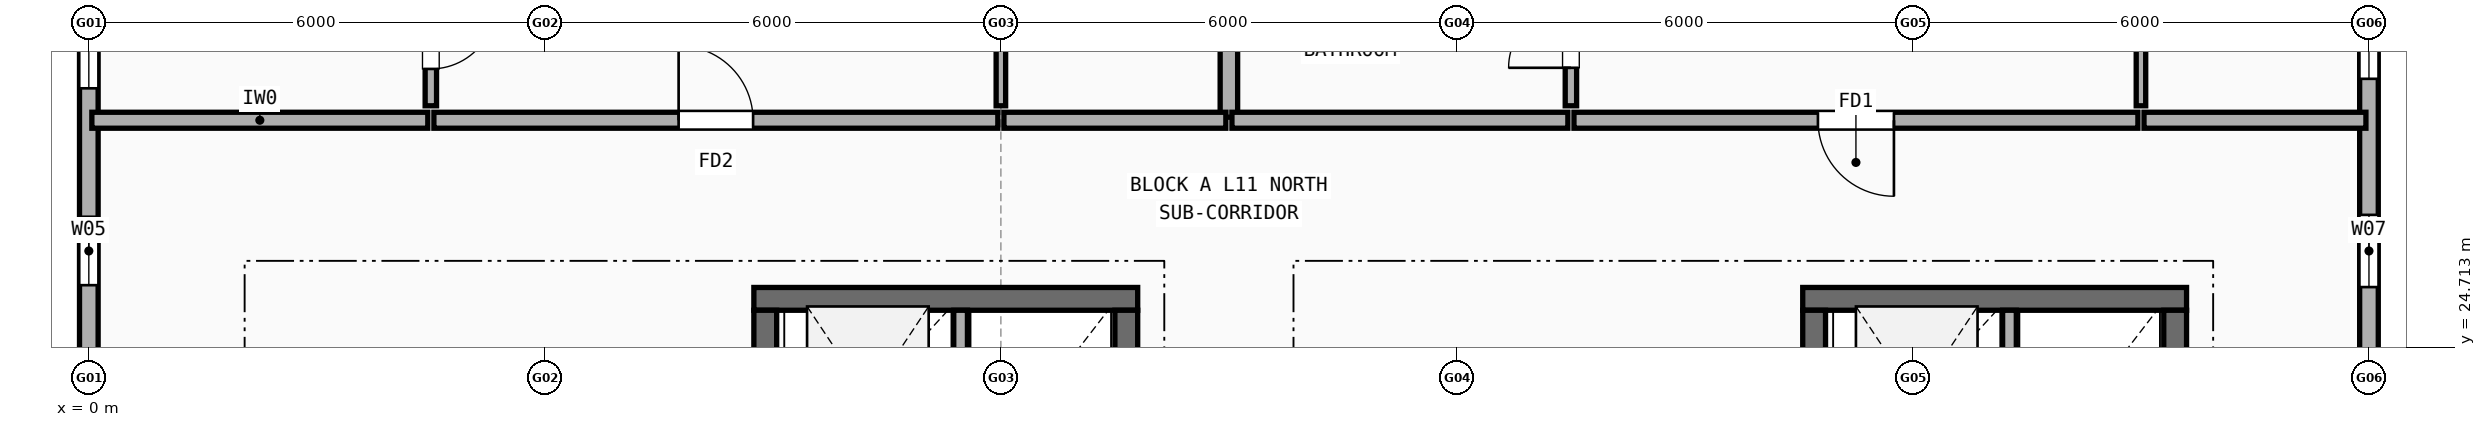
"""IFC4 building model, lengths in metres.
Left out: names, types, materials, properties, quantities, classifications, styles, units other than length and angle.
Written with IfcOpenShell. Run it as: python <this file> out.ifc"""

import sys

from ifc_helpers import new_model, si_unit, direction, frame, frame_2d, origin, place, context, subcontext, project, spatial, rectangle, extrude, element, fill, save


model = new_model("IFC4")
c1 = context("Model", 3, precision=1e-05, world=origin(), true_north=direction((0.0, 1.0)))
c2 = subcontext(c1, "Body", "Model", "MODEL_VIEW")
j1 = project(units=[si_unit("LENGTHUNIT", "METRE"), si_unit("PLANEANGLEUNIT", "RADIAN")], contexts=[c1])
p1 = place(None, origin())
s1 = spatial("IfcSite", under=j1, at=p1, CompositionType="ELEMENT")
p2 = place(p1, origin())
s2 = spatial("IfcBuilding", under=s1, at=p2, CompositionType="ELEMENT")
p3 = place(p2, frame((0.0, 0.0, 36.5)))
s3 = spatial("IfcBuildingStorey", under=s2, at=p3, CompositionType="ELEMENT", Elevation=36.5)
p4 = place(p3, frame((30.0, 24.3, 0.0), z_axis=(0.0, 0.0, 1.0), x_axis=(0.0, 1.0, 0.0)))
e1 = element("IfcWall", 1, at=p4, inside=s3, PredefinedType="STANDARD", context=c2, shape_type="SweptSolid", body=[
    extrude(rectangle(XDim=5.4, YDim=0.245, at=frame_2d((2.7, 0.0))), origin(), (0.0, 0.0, 1.0), 2.477),
])
p5 = place(p4, frame((1.205, 0.0, 0.9)))
e2 = element("IfcOpeningElement", 2, at=p5, cuts=e1, PredefinedType="OPENING", context=c2, shape_type="SweptSolid", body=[
    extrude(rectangle(XDim=0.95, YDim=1.35, at=frame_2d((0.475, 0.675))), frame((0.0, 0.133, 0.0), z_axis=(0.0, -1.0, 0.0), x_axis=(1.0, 0.0, 0.0)), (0.0, 0.0, 1.0), 0.265),
])
p6 = place(p4, frame((3.945, 0.0, 0.9)))
e3 = element("IfcOpeningElement", 3, at=p6, cuts=e1, PredefinedType="OPENING", context=c2, shape_type="SweptSolid", body=[
    extrude(rectangle(XDim=0.95, YDim=1.35, at=frame_2d((0.475, 0.675))), frame((0.0, 0.133, 0.0), z_axis=(0.0, -1.0, 0.0), x_axis=(1.0, 0.0, 0.0)), (0.0, 0.0, 1.0), 0.265),
])
p7 = place(p3, frame((0.0, 29.7, 0.0), z_axis=(0.0, 0.0, 1.0), x_axis=(0.0, -1.0, 0.0)))
e4 = element("IfcWall", 4, at=p7, inside=s3, PredefinedType="STANDARD", context=c2, shape_type="SweptSolid", body=[
    extrude(rectangle(XDim=5.4, YDim=0.245, at=frame_2d((2.7, 0.0))), origin(), (0.0, 0.0, 1.0), 2.477),
])
p8 = place(p7, frame((0.38, 0.0, 0.9)))
e5 = element("IfcOpeningElement", 5, at=p8, cuts=e4, PredefinedType="OPENING", context=c2, shape_type="SweptSolid", body=[
    extrude(rectangle(XDim=1.2, YDim=1.35, at=frame_2d((0.6, 0.675))), frame((0.0, 0.133, 0.0), z_axis=(0.0, -1.0, 0.0), x_axis=(1.0, 0.0, 0.0)), (0.0, 0.0, 1.0), 0.265),
])
p9 = place(p7, frame((3.27, 0.0, 0.9)))
e6 = element("IfcOpeningElement", 6, at=p9, cuts=e4, PredefinedType="OPENING", context=c2, shape_type="SweptSolid", body=[
    extrude(rectangle(XDim=0.9, YDim=1.4, at=frame_2d((0.45, 0.7))), frame((0.0, 0.133, 0.0), z_axis=(0.0, -1.0, 0.0), x_axis=(1.0, 0.0, 0.0)), (0.0, 0.0, 1.0), 0.265),
])
p10 = place(p3, frame((13.8, 25.35, 0.0), z_axis=(0.0, 0.0, 1.0), x_axis=(-1.0, 0.0, 0.0)))
e7 = element("IfcWall", 7, at=p10, inside=s3, PredefinedType="SHEAR", context=c2, shape_type="SweptSolid", body=[
    extrude(rectangle(XDim=5.05, YDim=0.3, at=frame_2d((2.525, 0.0))), origin(), (0.0, 0.0, 1.0), 2.995),
])
p11 = place(p3, frame((13.65, 18.75, 0.0), z_axis=(0.0, 0.0, 1.0), x_axis=(0.0, 1.0, 0.0)))
e8 = element("IfcWall", 8, at=p11, inside=s3, PredefinedType="SHEAR", context=c2, shape_type="SweptSolid", body=[
    extrude(rectangle(XDim=6.45, YDim=0.3, at=frame_2d((3.225, 0.0))), origin(), (0.0, 0.0, 1.0), 2.995),
])
p12 = place(p3, frame((8.9, 21.75, 0.0), z_axis=(0.0, 0.0, 1.0), x_axis=(0.0, 1.0, 0.0)))
e9 = element("IfcWall", 9, at=p12, inside=s3, PredefinedType="SHEAR", context=c2, shape_type="SweptSolid", body=[
    extrude(rectangle(XDim=3.45, YDim=0.3, at=frame_2d((1.725, 0.0))), origin(), (0.0, 0.0, 1.0), 2.995),
])
p13 = place(p3, frame((11.47, 22.94, 0.0), z_axis=(0.0, 0.0, 1.0), x_axis=(0.0, 1.0, 0.0)))
e10 = element("IfcWall", 10, at=p13, inside=s3, PredefinedType="SOLIDWALL", context=c2, shape_type="SweptSolid", body=[
    extrude(rectangle(XDim=2.26, YDim=0.18, at=frame_2d((1.13, 0.0))), origin(), (0.0, 0.0, 1.0), 2.995),
])
p14 = place(p3, frame((27.6, 25.35, 0.0), z_axis=(0.0, 0.0, 1.0), x_axis=(-1.0, 0.0, 0.0)))
e11 = element("IfcWall", 11, at=p14, inside=s3, PredefinedType="SHEAR", context=c2, shape_type="SweptSolid", body=[
    extrude(rectangle(XDim=5.05, YDim=0.3, at=frame_2d((2.525, 0.0))), origin(), (0.0, 0.0, 1.0), 2.995),
])
p15 = place(p3, frame((27.45, 18.75, 0.0), z_axis=(0.0, 0.0, 1.0), x_axis=(0.0, 1.0, 0.0)))
e12 = element("IfcWall", 12, at=p15, inside=s3, PredefinedType="SHEAR", context=c2, shape_type="SweptSolid", body=[
    extrude(rectangle(XDim=6.45, YDim=0.3, at=frame_2d((3.225, 0.0))), origin(), (0.0, 0.0, 1.0), 2.995),
])
p16 = place(p3, frame((22.7, 21.75, 0.0), z_axis=(0.0, 0.0, 1.0), x_axis=(0.0, 1.0, 0.0)))
e13 = element("IfcWall", 13, at=p16, inside=s3, PredefinedType="SHEAR", context=c2, shape_type="SweptSolid", body=[
    extrude(rectangle(XDim=3.45, YDim=0.3, at=frame_2d((1.725, 0.0))), origin(), (0.0, 0.0, 1.0), 2.995),
])
p17 = place(p3, frame((25.27, 22.94, 0.0), z_axis=(0.0, 0.0, 1.0), x_axis=(0.0, 1.0, 0.0)))
e14 = element("IfcWall", 14, at=p17, inside=s3, PredefinedType="SOLIDWALL", context=c2, shape_type="SweptSolid", body=[
    extrude(rectangle(XDim=2.26, YDim=0.18, at=frame_2d((1.13, 0.0))), origin(), (0.0, 0.0, 1.0), 2.995),
])
p18 = place(p3, frame((15.0, 27.74, 0.0), z_axis=(0.0, 0.0, 1.0), x_axis=(0.0, 1.0, 0.0)))
e15 = element("IfcWall", 15, at=p18, inside=s3, PredefinedType="SOLIDWALL", context=c2, shape_type="SweptSolid", body=[
    extrude(rectangle(XDim=7.87, YDim=0.23, at=frame_2d((3.935, 0.0))), origin(), (0.0, 0.0, 1.0), 2.527),
])
p19 = place(p3, frame((0.04, 27.7, 0.0), z_axis=(0.0, 0.0, 1.0), x_axis=(1.0, 0.0, 0.0)))
e16 = element("IfcWall", 16, at=p19, inside=s3, PredefinedType="SOLIDWALL", context=c2, shape_type="SweptSolid", body=[
    extrude(rectangle(XDim=4.42, YDim=0.21, at=frame_2d((2.21, 0.0))), origin(), (0.0, 0.0, 1.0), 2.477),
])
p20 = place(p3, frame((4.54, 27.7, 0.0), z_axis=(0.0, 0.0, 1.0), x_axis=(1.0, 0.0, 0.0)))
e17 = element("IfcWall", 17, at=p20, inside=s3, PredefinedType="SOLIDWALL", context=c2, shape_type="SweptSolid", body=[
    extrude(rectangle(XDim=7.42, YDim=0.21, at=frame_2d((3.71, 0.0))), origin(), (0.0, 0.0, 1.0), 2.508),
])
p21 = place(p20, frame((3.22, 0.0, 0.0)))
e18 = element("IfcOpeningElement", 18, at=p21, cuts=e17, PredefinedType="OPENING", context=c2, shape_type="SweptSolid", body=[
    extrude(rectangle(XDim=0.98, YDim=2.15, at=frame_2d((0.49, 1.075))), frame((0.0, 0.115, 0.0), z_axis=(0.0, -1.0, 0.0), x_axis=(1.0, 0.0, 0.0)), (0.0, 0.0, 1.0), 0.23),
])
p22 = place(p3, frame((4.5, 27.89, 0.0), z_axis=(0.0, 0.0, 1.0), x_axis=(0.0, 1.0, 0.0)))
e19 = element("IfcWall", 19, at=p22, inside=s3, PredefinedType="PARTITIONING", context=c2, shape_type="SweptSolid", body=[
    extrude(rectangle(XDim=1.82, YDim=0.15, at=frame_2d((0.91, 0.0))), origin(), (0.0, 0.0, 1.0), 2.995),
])
p23 = place(p22, frame((0.485, 0.0, 0.0)))
e20 = element("IfcOpeningElement", 20, at=p23, cuts=e19, PredefinedType="OPENING", context=c2, shape_type="SweptSolid", body=[
    extrude(rectangle(XDim=0.85, YDim=2.1, at=frame_2d((0.425, 1.05))), frame((0.0, 0.085, 0.0), z_axis=(0.0, -1.0, 0.0), x_axis=(1.0, 0.0, 0.0)), (0.0, 0.0, 1.0), 0.17),
])
p24 = place(p3, frame((12.04, 27.7, 0.0), z_axis=(0.0, 0.0, 1.0), x_axis=(1.0, 0.0, 0.0)))
e21 = element("IfcWall", 21, at=p24, inside=s3, PredefinedType="SOLIDWALL", context=c2, shape_type="SweptSolid", body=[
    extrude(rectangle(XDim=2.92, YDim=0.21, at=frame_2d((1.46, 0.0))), origin(), (0.0, 0.0, 1.0), 2.508),
])
p25 = place(p3, frame((12.0, 27.89, 0.0), z_axis=(0.0, 0.0, 1.0), x_axis=(0.0, 1.0, 0.0)))
e22 = element("IfcWall", 22, at=p25, inside=s3, PredefinedType="PARTITIONING", context=c2, shape_type="SweptSolid", body=[
    extrude(rectangle(XDim=7.6, YDim=0.125, at=frame_2d((3.8, 0.0))), origin(), (0.0, 0.0, 1.0), 2.508),
])
p26 = place(p25, frame((3.65, 0.0, 0.0)))
e23 = element("IfcOpeningElement", 23, at=p26, cuts=e22, PredefinedType="OPENING", context=c2, shape_type="SweptSolid", body=[
    extrude(rectangle(XDim=0.88, YDim=2.1, at=frame_2d((0.44, 1.05))), frame((0.0, 0.073, 0.0), z_axis=(0.0, -1.0, 0.0), x_axis=(1.0, 0.0, 0.0)), (0.0, 0.0, 1.0), 0.145),
])
p27 = place(p3, frame((15.04, 27.7, 0.0), z_axis=(0.0, 0.0, 1.0), x_axis=(1.0, 0.0, 0.0)))
e24 = element("IfcWall", 24, at=p27, inside=s3, PredefinedType="SOLIDWALL", context=c2, shape_type="SweptSolid", body=[
    extrude(rectangle(XDim=4.42, YDim=0.21, at=frame_2d((2.21, 0.0))), origin(), (0.0, 0.0, 1.0), 2.995),
])
p28 = place(p3, frame((19.54, 27.7, 0.0), z_axis=(0.0, 0.0, 1.0), x_axis=(1.0, 0.0, 0.0)))
e25 = element("IfcWall", 25, at=p28, inside=s3, PredefinedType="SOLIDWALL", context=c2, shape_type="SweptSolid", body=[
    extrude(rectangle(XDim=7.42, YDim=0.21, at=frame_2d((3.71, 0.0))), origin(), (0.0, 0.0, 1.0), 2.995),
])
p29 = place(p28, frame((3.21, 0.0, 0.0)))
e26 = element("IfcOpeningElement", 26, at=p29, cuts=e25, PredefinedType="OPENING", context=c2, shape_type="SweptSolid", body=[
    extrude(rectangle(XDim=1.0, YDim=2.15, at=frame_2d((0.5, 1.075))), frame((0.0, 0.115, 0.0), z_axis=(0.0, -1.0, 0.0), x_axis=(1.0, 0.0, 0.0)), (0.0, 0.0, 1.0), 0.23),
])
p30 = place(p3, frame((19.5, 27.89, 0.0), z_axis=(0.0, 0.0, 1.0), x_axis=(0.0, 1.0, 0.0)))
e27 = element("IfcWall", 27, at=p30, inside=s3, PredefinedType="PARTITIONING", context=c2, shape_type="SweptSolid", body=[
    extrude(rectangle(XDim=1.82, YDim=0.15, at=frame_2d((0.91, 0.0))), origin(), (0.0, 0.0, 1.0), 2.995),
])
p31 = place(p30, frame((0.5, 0.0, 0.0)))
e28 = element("IfcOpeningElement", 28, at=p31, cuts=e27, PredefinedType="OPENING", context=c2, shape_type="SweptSolid", body=[
    extrude(rectangle(XDim=0.82, YDim=2.08, at=frame_2d((0.41, 1.04))), frame((0.0, 0.085, 0.0), z_axis=(0.0, -1.0, 0.0), x_axis=(1.0, 0.0, 0.0)), (0.0, 0.0, 1.0), 0.17),
])
p32 = place(p3, frame((27.04, 27.7, 0.0), z_axis=(0.0, 0.0, 1.0), x_axis=(1.0, 0.0, 0.0)))
e29 = element("IfcWall", 29, at=p32, inside=s3, PredefinedType="SOLIDWALL", context=c2, shape_type="SweptSolid", body=[
    extrude(rectangle(XDim=2.92, YDim=0.21, at=frame_2d((1.46, 0.0))), origin(), (0.0, 0.0, 1.0), 2.477),
])
p33 = place(p3, frame((27.0, 27.89, 0.0), z_axis=(0.0, 0.0, 1.0), x_axis=(0.0, 1.0, 0.0)))
e30 = element("IfcWall", 30, at=p33, inside=s3, PredefinedType="PARTITIONING", context=c2, shape_type="SweptSolid", body=[
    extrude(rectangle(XDim=7.92, YDim=0.125, at=frame_2d((3.96, 0.0))), origin(), (0.0, 0.0, 1.0), 2.527),
])
p34 = place(p33, frame((3.65, 0.0, 0.0)))
e31 = element("IfcOpeningElement", 31, at=p34, cuts=e30, PredefinedType="OPENING", context=c2, shape_type="SweptSolid", body=[
    extrude(rectangle(XDim=0.9, YDim=2.1, at=frame_2d((0.45, 1.05))), frame((0.0, 0.073, 0.0), z_axis=(0.0, -1.0, 0.0), x_axis=(1.0, 0.0, 0.0)), (0.0, 0.0, 1.0), 0.145),
])
p35 = place(p5, origin())
e32 = element("IfcWindow", 32, at=p35, inside=s3, PartitioningType="SINGLE_PANEL", PredefinedType="WINDOW", context=c2, shape_type="SweptSolid", body=[
    extrude(rectangle(XDim=0.95, YDim=1.35, at=frame_2d((0.475, 0.675))), frame((0.0, 0.03, 0.0), z_axis=(0.0, -1.0, 0.0), x_axis=(1.0, 0.0, 0.0)), (0.0, 0.0, 1.0), 0.06),
])
fill(e2, e32)
p36 = place(p6, origin())
e33 = element("IfcWindow", 33, at=p36, inside=s3, PartitioningType="SINGLE_PANEL", PredefinedType="WINDOW", context=c2, shape_type="SweptSolid", body=[
    extrude(rectangle(XDim=0.95, YDim=1.35, at=frame_2d((0.475, 0.675))), frame((0.0, 0.03, 0.0), z_axis=(0.0, -1.0, 0.0), x_axis=(1.0, 0.0, 0.0)), (0.0, 0.0, 1.0), 0.06),
])
fill(e3, e33)
p37 = place(p8, origin())
e34 = element("IfcWindow", 34, at=p37, inside=s3, PartitioningType="SINGLE_PANEL", PredefinedType="WINDOW", context=c2, shape_type="SweptSolid", body=[
    extrude(rectangle(XDim=1.2, YDim=1.35, at=frame_2d((0.6, 0.675))), frame((0.0, 0.03, 0.0), z_axis=(0.0, -1.0, 0.0), x_axis=(1.0, 0.0, 0.0)), (0.0, 0.0, 1.0), 0.06),
])
fill(e5, e34)
p38 = place(p9, origin())
e35 = element("IfcWindow", 35, at=p38, inside=s3, PartitioningType="SINGLE_PANEL", PredefinedType="WINDOW", context=c2, shape_type="SweptSolid", body=[
    extrude(rectangle(XDim=0.9, YDim=1.4, at=frame_2d((0.45, 0.7))), frame((0.0, 0.03, 0.0), z_axis=(0.0, -1.0, 0.0), x_axis=(1.0, 0.0, 0.0)), (0.0, 0.0, 1.0), 0.06),
])
fill(e6, e35)
p39 = place(p21, origin())
e36 = element("IfcDoor", 36, at=p39, inside=s3, OperationType="SINGLE_SWING_LEFT", PredefinedType="DOOR", context=c2, shape_type="SweptSolid", body=[
    extrude(rectangle(XDim=0.98, YDim=2.15, at=frame_2d((0.49, 1.075))), frame((0.0, 0.025, 0.0), z_axis=(0.0, -1.0, 0.0), x_axis=(1.0, 0.0, 0.0)), (0.0, 0.0, 1.0), 0.05),
])
fill(e18, e36)
p40 = place(p23, origin())
e37 = element("IfcDoor", 37, at=p40, inside=s3, OperationType="SINGLE_SWING_RIGHT", PredefinedType="DOOR", context=c2, shape_type="SweptSolid", body=[
    extrude(rectangle(XDim=0.85, YDim=2.1, at=frame_2d((0.425, 1.05))), frame((0.0, 0.025, 0.0), z_axis=(0.0, -1.0, 0.0), x_axis=(1.0, 0.0, 0.0)), (0.0, 0.0, 1.0), 0.05),
])
fill(e20, e37)
p41 = place(p29, origin())
e38 = element("IfcDoor", 38, at=p41, inside=s3, OperationType="SINGLE_SWING_RIGHT", PredefinedType="DOOR", context=c2, shape_type="SweptSolid", body=[
    extrude(rectangle(XDim=1.0, YDim=2.15, at=frame_2d((0.5, 1.075))), frame((0.0, 0.025, 0.0), z_axis=(0.0, -1.0, 0.0), x_axis=(1.0, 0.0, 0.0)), (0.0, 0.0, 1.0), 0.05),
])
fill(e26, e38)
p42 = place(p31, origin())
e39 = element("IfcDoor", 39, at=p42, inside=s3, OperationType="SINGLE_SWING_LEFT", PredefinedType="DOOR", context=c2, shape_type="SweptSolid", body=[
    extrude(rectangle(XDim=0.82, YDim=2.08, at=frame_2d((0.41, 1.04))), frame((0.0, 0.025, 0.0), z_axis=(0.0, -1.0, 0.0), x_axis=(1.0, 0.0, 0.0)), (0.0, 0.0, 1.0), 0.05),
])
fill(e28, e39)
save(model, sys.argv[1])
